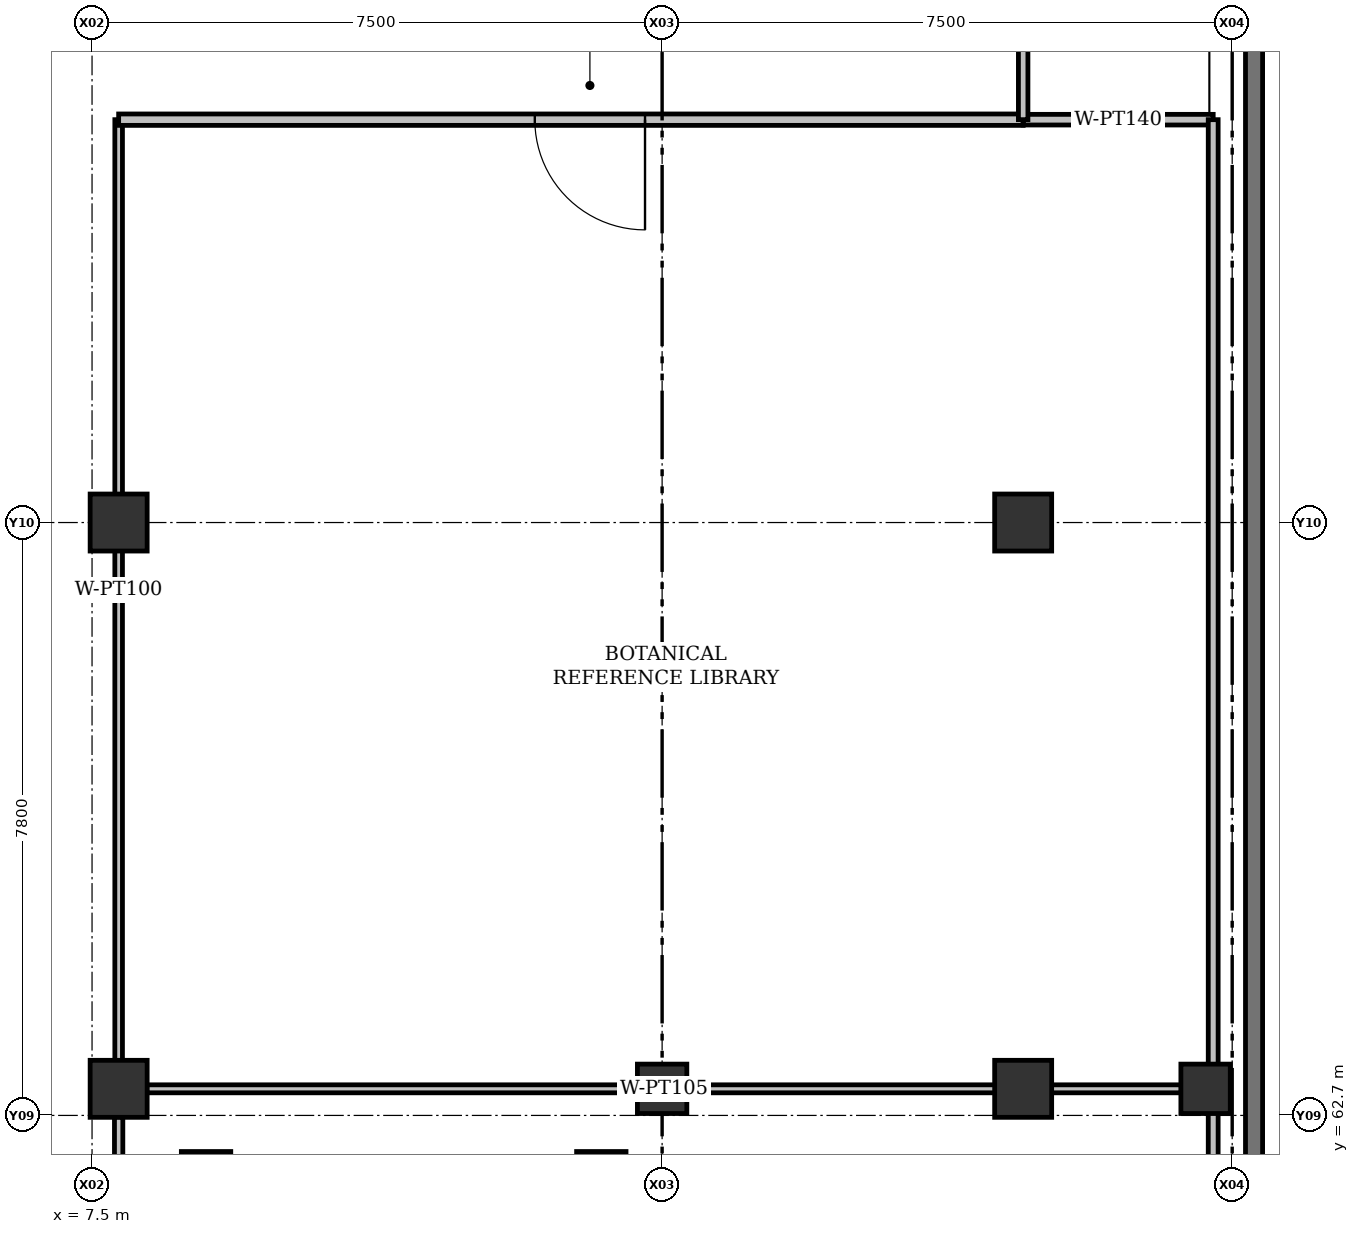
"""IFC4 building model, lengths in metres.
Left out: names, types, materials, properties, quantities, classifications, styles, units other than length and angle.
Written with IfcOpenShell. Run it as: python <this file> out.ifc"""

import sys

from ifc_helpers import new_model, si_unit, direction, frame, frame_2d, origin, origin_2d, place, context, subcontext, project, spatial, rectangle, extrude, element, fill, save


model = new_model("IFC4")
c1 = context("Model", 3, precision=1e-05, world=origin(), true_north=direction((0.0, 1.0)))
c2 = subcontext(c1, "Body", "Model", "MODEL_VIEW")
j1 = project(units=[si_unit("LENGTHUNIT", "METRE"), si_unit("PLANEANGLEUNIT", "RADIAN")], contexts=[c1])
p1 = place(None, origin())
s1 = spatial("IfcSite", under=j1, at=p1, CompositionType="ELEMENT")
p2 = place(p1, origin())
s2 = spatial("IfcBuilding", under=s1, at=p2, CompositionType="ELEMENT")
p3 = place(p2, frame((0.0, 0.0, -4.2)))
s3 = spatial("IfcBuildingStorey", under=s2, at=p3, CompositionType="ELEMENT", Elevation=-4.2)
for number, where, z_axis, x_axis in (
    (1, (7.85, 63.05, 0.0), (0.0, 0.0, 1.0), (1.0, 0.0, 0.0)),
    (2, (19.75, 63.05, 0.0), (0.0, 0.0, 1.0), (1.0, 0.0, 0.0)),
    (3, (7.85, 70.5, 0.0), (0.0, 0.0, 1.0), (1.0, 0.0, 0.0)),
    (4, (19.75, 70.5, 0.0), (0.0, 0.0, 1.0), (1.0, 0.0, 0.0)),
):
    element("IfcColumn", number, at=place(p3, frame(where, z_axis=z_axis, x_axis=x_axis)), inside=s3, PredefinedType="COLUMN", context=c2, shape_type="SweptSolid", body=[
        extrude(rectangle(XDim=0.75, YDim=0.75, at=origin_2d()), origin(), (0.0, 0.0, 1.0), 4.2),
    ])
for number, where, z_axis, x_axis in (
    (5, (15.0, 63.05, 0.0), (0.0, 0.0, 1.0), (1.0, 0.0, 0.0)),
    (6, (22.15, 63.05, 0.0), (0.0, 0.0, 1.0), (1.0, 0.0, 0.0)),
    (7, (9.0, 61.9, 0.0), (0.0, 0.0, 1.0), (1.0, 0.0, 0.0)),
    (8, (14.2, 61.9, 0.0), (0.0, 0.0, 1.0), (1.0, 0.0, 0.0)),
):
    element("IfcColumn", number, at=place(p3, frame(where, z_axis=z_axis, x_axis=x_axis)), inside=s3, PredefinedType="COLUMN", context=c2, shape_type="SweptSolid", body=[
        extrude(rectangle(XDim=0.65, YDim=0.65, at=origin_2d()), origin(), (0.0, 0.0, 1.0), 4.2),
    ])
p4 = place(p3, frame((22.788, 53.988, 0.0), z_axis=(0.0, 0.0, 1.0), x_axis=(0.0, 1.0, 0.0)))
e9 = element("IfcWall", 9, at=p4, inside=s3, PredefinedType="SHEAR", context=c2, shape_type="SweptSolid", body=[
    extrude(rectangle(XDim=38.512, YDim=0.225, at=frame_2d((19.256, 0.0))), origin(), (0.0, 0.0, 1.0), 3.92),
])
p5 = place(p3, frame((7.85, 54.57, 0.0), z_axis=(0.0, 0.0, 1.0), x_axis=(0.0, 1.0, 0.0)))
e10 = element("IfcWall", 10, at=p5, inside=s3, PredefinedType="PARTITIONING", context=c2, shape_type="SweptSolid", body=[
    extrude(rectangle(XDim=8.11, YDim=0.11, at=frame_2d((4.055, 0.0))), origin(), (0.0, 0.0, 1.0), 3.95),
])
p6 = place(p5, frame((3.16, 0.0, 0.0)))
e11 = element("IfcOpeningElement", 11, at=p6, cuts=e10, PredefinedType="OPENING", context=c2, shape_type="SweptSolid", body=[
    extrude(rectangle(XDim=1.6, YDim=2.25, at=frame_2d((0.8, 1.125))), frame((0.0, 0.055, 0.0), z_axis=(0.0, -1.0, 0.0), x_axis=(1.0, 0.0, 0.0)), (0.0, 0.0, 1.0), 0.11),
])
p7 = place(p3, frame((8.22, 63.05, 0.0), z_axis=(0.0, 0.0, 1.0), x_axis=(1.0, 0.0, 0.0)))
e12 = element("IfcWall", 12, at=p7, inside=s3, PredefinedType="PARTITIONING", context=c2, shape_type="SweptSolid", body=[
    extrude(rectangle(XDim=13.61, YDim=0.105, at=frame_2d((6.805, 0.0))), origin(), (0.0, 0.0, 1.0), 3.527),
])
p8 = place(p3, frame((7.85, 75.8, 0.0), z_axis=(0.0, 0.0, 1.0), x_axis=(0.0, -1.0, 0.0)))
e13 = element("IfcWall", 13, at=p8, inside=s3, PredefinedType="PARTITIONING", context=c2, shape_type="SweptSolid", body=[
    extrude(rectangle(XDim=12.38, YDim=0.1, at=frame_2d((6.19, 0.0))), origin(), (0.0, 0.0, 1.0), 3.477),
])
p9 = place(p3, frame((19.75, 75.8, 0.0), z_axis=(0.0, 0.0, 1.0), x_axis=(-1.0, 0.0, 0.0)))
e14 = element("IfcWall", 14, at=p9, inside=s3, PredefinedType="PARTITIONING", context=c2, shape_type="SweptSolid", body=[
    extrude(rectangle(XDim=11.9, YDim=0.15, at=frame_2d((5.95, 0.0))), origin(), (0.0, 0.0, 1.0), 3.477),
])
p10 = place(p9, frame((4.975, 0.0, 0.0)))
e15 = element("IfcOpeningElement", 15, at=p10, cuts=e14, PredefinedType="OPENING", context=c2, shape_type="SweptSolid", body=[
    extrude(rectangle(XDim=1.45, YDim=2.2, at=frame_2d((0.725, 1.1))), frame((0.0, 0.075, 0.0), z_axis=(0.0, -1.0, 0.0), x_axis=(1.0, 0.0, 0.0)), (0.0, 0.0, 1.0), 0.15),
])
p11 = place(p3, frame((22.25, 75.8, 0.0), z_axis=(0.0, 0.0, 1.0), x_axis=(-1.0, 0.0, 0.0)))
e16 = element("IfcWall", 16, at=p11, inside=s3, PredefinedType="PARTITIONING", context=c2, shape_type="SweptSolid", body=[
    extrude(rectangle(XDim=2.5, YDim=0.14, at=frame_2d((1.25, 0.0))), origin(), (0.0, 0.0, 1.0), 3.477),
])
p12 = place(p3, frame((22.25, 54.57, 0.0), z_axis=(0.0, 0.0, 1.0), x_axis=(0.0, 1.0, 0.0)))
e17 = element("IfcWall", 17, at=p12, inside=s3, PredefinedType="PARTITIONING", context=c2, shape_type="SweptSolid", body=[
    extrude(rectangle(XDim=21.23, YDim=0.13, at=frame_2d((10.615, 0.0))), origin(), (0.0, 0.0, 1.0), 3.401),
])
p13 = place(p3, frame((19.75, 92.03, 0.0), z_axis=(0.0, 0.0, 1.0), x_axis=(0.0, -1.0, 0.0)))
e18 = element("IfcWall", 18, at=p13, inside=s3, PredefinedType="PARTITIONING", context=c2, shape_type="SweptSolid", body=[
    extrude(rectangle(XDim=16.23, YDim=0.125, at=frame_2d((8.115, 0.0))), origin(), (0.0, 0.0, 1.0), 3.477),
])
p14 = place(p10, origin())
e19 = element("IfcDoor", 19, at=p14, inside=s3, OperationType="SINGLE_SWING_LEFT", PredefinedType="DOOR", context=c2, shape_type="SweptSolid", body=[
    extrude(rectangle(XDim=1.45, YDim=2.2, at=frame_2d((0.725, 1.1))), frame((0.0, 0.025, 0.0), z_axis=(0.0, -1.0, 0.0), x_axis=(1.0, 0.0, 0.0)), (0.0, 0.0, 1.0), 0.05),
])
fill(e15, e19)
save(model, sys.argv[1])
